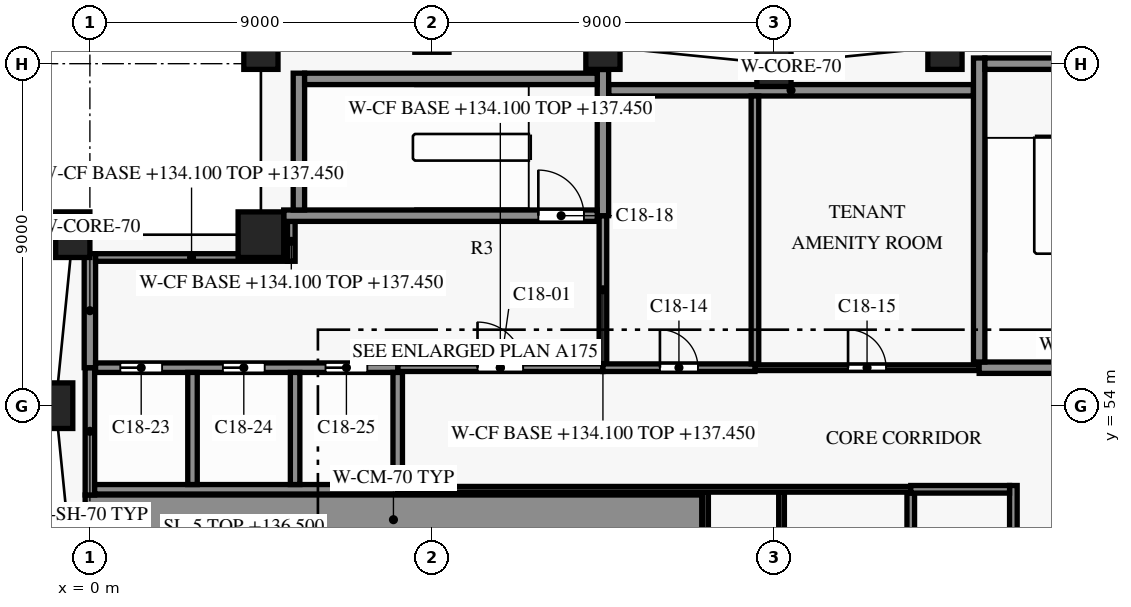
"""IFC4 building model, lengths in metres.
Left out: names, types, materials, properties, quantities, classifications, styles, units other than length and angle.
Written with IfcOpenShell. Run it as: python <this file> out.ifc"""

import sys

from ifc_helpers import new_model, si_unit, direction, frame, frame_2d, origin, origin_2d, place, context, subcontext, project, spatial, rectangle, extrude, element, fill, save


model = new_model("IFC4")
c1 = context("Model", 3, precision=1e-05, world=origin(), true_north=direction((0.0, 1.0)))
c2 = subcontext(c1, "Body", "Model", "MODEL_VIEW")
j1 = project(units=[si_unit("LENGTHUNIT", "METRE"), si_unit("PLANEANGLEUNIT", "RADIAN")], contexts=[c1])
p1 = place(None, origin())
s1 = spatial("IfcSite", under=j1, at=p1, CompositionType="ELEMENT")
p2 = place(p1, origin())
s2 = spatial("IfcBuilding", under=s1, at=p2, CompositionType="ELEMENT")
p3 = place(p2, frame((0.0, 0.0, 134.1)))
s3 = spatial("IfcBuildingStorey", under=s2, at=p3, CompositionType="ELEMENT", Elevation=134.1)
for number, where, z_axis, x_axis in (
    (1, (22.5, 63.45, 0.0), (0.0, 0.0, 1.0), (-0.995, -0.1, 0.0)),
    (2, (18.0, 63.0, 0.0), (0.0, 0.0, 1.0), (-1.0, 0.0, 0.0)),
    (3, (13.5, 63.45, 0.0), (0.0, 0.0, 1.0), (-0.995, 0.1, 0.0)),
    (4, (9.0, 63.9, 0.0), (0.0, 0.0, 1.0), (-1.0, 0.0, 0.0)),
    (5, (4.5, 63.45, 0.0), (0.0, 0.0, 1.0), (-0.995, -0.1, 0.0)),
    (6, (-0.45, 58.5, 0.0), (0.0, 0.0, 1.0), (-0.1, -0.995, 0.0)),
    (7, (-0.9, 54.0, 0.0), (0.0, 0.0, 1.0), (0.0, -1.0, 0.0)),
):
    element("IfcColumn", number, at=place(p3, frame(where, z_axis=z_axis, x_axis=x_axis)), inside=s3, PredefinedType="COLUMN", context=c2, shape_type="SweptSolid", body=[
        extrude(rectangle(XDim=0.9, YDim=1.2, at=origin_2d()), origin(), (0.0, 0.0, 1.0), 3.8),
    ])
p4 = place(p3, frame((4.5, 58.5, 0.0), z_axis=(0.0, 0.0, 1.0), x_axis=(1.0, 0.0, 0.0)))
e8 = element("IfcColumn", 8, at=p4, inside=s3, PredefinedType="COLUMN", context=c2, shape_type="SweptSolid", body=[
    extrude(rectangle(XDim=1.2, YDim=1.2, at=origin_2d()), origin(), (0.0, 0.0, 1.0), 3.8),
])
p5 = place(p3, frame((-0.125, 51.0, 0.0), z_axis=(0.0, 0.0, 1.0), x_axis=(1.0, 0.0, 0.0)))
e9 = element("IfcWall", 9, at=p5, inside=s3, PredefinedType="SHEAR", context=c2, shape_type="SweptSolid", body=[
    extrude(rectangle(XDim=16.225, YDim=1.3, at=frame_2d((8.113, 0.0))), origin(), (0.0, 0.0, 1.0), 3.5),
])
p6 = place(p3, frame((8.1, 51.8, 0.0), z_axis=(0.0, 0.0, 1.0), x_axis=(1.0, 0.0, 0.0)))
e10 = element("IfcWall", 10, at=p6, inside=s3, PredefinedType="PARTITIONING", context=c2, shape_type="SweptSolid", body=[
    extrude(rectangle(XDim=13.5, YDim=0.15, at=frame_2d((6.75, 0.0))), origin(), (0.0, 0.0, 1.0), 3.35),
])
p7 = place(p3, frame((21.6, 51.8, 0.0), z_axis=(0.0, 0.0, 1.0), x_axis=(1.0, 0.0, 0.0)))
e11 = element("IfcWall", 11, at=p7, inside=s3, PredefinedType="PARTITIONING", context=c2, shape_type="SweptSolid", body=[
    extrude(rectangle(XDim=2.6, YDim=0.2, at=frame_2d((1.3, 0.0))), origin(), (0.0, 0.0, 1.0), 3.35),
])
p8 = place(p3, frame((0.125, 51.8, 0.0), z_axis=(0.0, 0.0, 1.0), x_axis=(1.0, 0.0, 0.0)))
e12 = element("IfcWall", 12, at=p8, inside=s3, PredefinedType="SHEAR", context=c2, shape_type="SweptSolid", body=[
    extrude(rectangle(XDim=7.975, YDim=0.25, at=frame_2d((3.988, 0.0))), origin(), (0.0, 0.0, 1.0), 3.5),
])
p9 = place(p3, frame((8.1, 55.0, 0.0), z_axis=(0.0, 0.0, 1.0), x_axis=(1.0, 0.0, 0.0)))
e13 = element("IfcWall", 13, at=p9, inside=s3, PredefinedType="PARTITIONING", context=c2, shape_type="SweptSolid", body=[
    extrude(rectangle(XDim=5.4, YDim=0.2, at=frame_2d((2.7, 0.0))), origin(), (0.0, 0.0, 1.0), 3.35),
])
p10 = place(p9, frame((2.1, 0.0, 0.0)))
e14 = element("IfcOpeningElement", 14, at=p10, cuts=e13, PredefinedType="OPENING", context=c2, shape_type="SweptSolid", body=[
    extrude(rectangle(XDim=1.2, YDim=2.2, at=frame_2d((0.6, 1.1))), frame((0.0, 0.11, 0.0), z_axis=(0.0, -1.0, 0.0), x_axis=(1.0, 0.0, 0.0)), (0.0, 0.0, 1.0), 0.22),
])
p11 = place(p3, frame((17.5, 55.0, 0.0), z_axis=(0.0, 0.0, 1.0), x_axis=(1.0, 0.0, 0.0)))
e15 = element("IfcWall", 15, at=p11, inside=s3, PredefinedType="PARTITIONING", context=c2, shape_type="SweptSolid", body=[
    extrude(rectangle(XDim=5.9, YDim=0.15, at=frame_2d((2.95, 0.0))), origin(), (0.0, 0.0, 1.0), 3.35),
])
p12 = place(p11, frame((2.45, 0.0, 0.0)))
e16 = element("IfcOpeningElement", 16, at=p12, cuts=e15, PredefinedType="OPENING", context=c2, shape_type="SweptSolid", body=[
    extrude(rectangle(XDim=1.0, YDim=2.1, at=frame_2d((0.5, 1.05))), frame((0.0, 0.085, 0.0), z_axis=(0.0, -1.0, 0.0), x_axis=(1.0, 0.0, 0.0)), (0.0, 0.0, 1.0), 0.17),
])
p13 = place(p3, frame((13.5, 55.0, 0.0), z_axis=(0.0, 0.0, 1.0), x_axis=(1.0, 0.0, 0.0)))
e17 = element("IfcWall", 17, at=p13, inside=s3, PredefinedType="PARTITIONING", context=c2, shape_type="SweptSolid", body=[
    extrude(rectangle(XDim=4.0, YDim=0.2, at=frame_2d((2.0, 0.0))), origin(), (0.0, 0.0, 1.0), 3.35),
])
p14 = place(p13, frame((1.5, 0.0, 0.0)))
e18 = element("IfcOpeningElement", 18, at=p14, cuts=e17, PredefinedType="OPENING", context=c2, shape_type="SweptSolid", body=[
    extrude(rectangle(XDim=1.0, YDim=2.1, at=frame_2d((0.5, 1.05))), frame((0.0, 0.11, 0.0), z_axis=(0.0, -1.0, 0.0), x_axis=(1.0, 0.0, 0.0)), (0.0, 0.0, 1.0), 0.22),
])
p15 = place(p3, frame((0.15, 55.0, 0.0), z_axis=(0.0, 0.0, 1.0), x_axis=(1.0, 0.0, 0.0)))
e19 = element("IfcWall", 19, at=p15, inside=s3, PredefinedType="SHEAR", context=c2, shape_type="SweptSolid", body=[
    extrude(rectangle(XDim=7.95, YDim=0.25, at=frame_2d((3.975, 0.0))), origin(), (0.0, 0.0, 1.0), 3.5),
])
p16 = place(p15, frame((0.65, 0.0, 0.0)))
e20 = element("IfcOpeningElement", 20, at=p16, cuts=e19, PredefinedType="OPENING", context=c2, shape_type="SweptSolid", body=[
    extrude(rectangle(XDim=1.1, YDim=2.1, at=frame_2d((0.55, 1.05))), frame((0.0, 0.135, 0.0), z_axis=(0.0, -1.0, 0.0), x_axis=(1.0, 0.0, 0.0)), (0.0, 0.0, 1.0), 0.27),
])
p17 = place(p15, frame((3.35, 0.0, 0.0)))
e21 = element("IfcOpeningElement", 21, at=p17, cuts=e19, PredefinedType="OPENING", context=c2, shape_type="SweptSolid", body=[
    extrude(rectangle(XDim=1.1, YDim=2.1, at=frame_2d((0.55, 1.05))), frame((0.0, 0.135, 0.0), z_axis=(0.0, -1.0, 0.0), x_axis=(1.0, 0.0, 0.0)), (0.0, 0.0, 1.0), 0.27),
])
p18 = place(p15, frame((6.05, 0.0, 0.0)))
e22 = element("IfcOpeningElement", 22, at=p18, cuts=e19, PredefinedType="OPENING", context=c2, shape_type="SweptSolid", body=[
    extrude(rectangle(XDim=1.1, YDim=2.1, at=frame_2d((0.55, 1.05))), frame((0.0, 0.135, 0.0), z_axis=(0.0, -1.0, 0.0), x_axis=(1.0, 0.0, 0.0)), (0.0, 0.0, 1.0), 0.27),
])
p19 = place(p3, frame((23.4, 55.0, 0.0), z_axis=(0.0, 0.0, 1.0), x_axis=(1.0, 0.0, 0.0)))
e23 = element("IfcWall", 23, at=p19, inside=s3, PredefinedType="SHEAR", context=c2, shape_type="SweptSolid", body=[
    extrude(rectangle(XDim=3.45, YDim=0.3, at=frame_2d((1.725, 0.0))), origin(), (0.0, 0.0, 1.0), 3.5),
])
p20 = place(p3, frame((0.15, 57.9, 0.0), z_axis=(0.0, 0.0, 1.0), x_axis=(1.0, 0.0, 0.0)))
e24 = element("IfcWall", 24, at=p20, inside=s3, PredefinedType="PARTITIONING", context=c2, shape_type="SweptSolid", body=[
    extrude(rectangle(XDim=5.05, YDim=0.2, at=frame_2d((2.525, 0.0))), origin(), (0.0, 0.0, 1.0), 3.35),
])
p21 = place(p3, frame((5.1, 59.0, 0.0), z_axis=(0.0, 0.0, 1.0), x_axis=(1.0, 0.0, 0.0)))
e25 = element("IfcWall", 25, at=p21, inside=s3, PredefinedType="SHEAR", context=c2, shape_type="SweptSolid", body=[
    extrude(rectangle(XDim=8.25, YDim=0.3, at=frame_2d((4.125, 0.0))), origin(), (0.0, 0.0, 1.0), 3.5),
])
p22 = place(p21, frame((6.7, 0.0, 0.0)))
e26 = element("IfcOpeningElement", 26, at=p22, cuts=e25, PredefinedType="OPENING", context=c2, shape_type="SweptSolid", body=[
    extrude(rectangle(XDim=1.2, YDim=2.2, at=frame_2d((0.6, 1.1))), frame((0.0, 0.16, 0.0), z_axis=(0.0, -1.0, 0.0), x_axis=(1.0, 0.0, 0.0)), (0.0, 0.0, 1.0), 0.32),
])
p23 = place(p3, frame((13.65, 62.3, 0.0), z_axis=(0.0, 0.0, 1.0), x_axis=(1.0, 0.0, 0.0)))
e27 = element("IfcWall", 27, at=p23, inside=s3, PredefinedType="SHEAR", context=c2, shape_type="SweptSolid", body=[
    extrude(rectangle(XDim=9.6, YDim=0.3, at=frame_2d((4.8, 0.0))), origin(), (0.0, 0.0, 1.0), 3.5),
])
p24 = place(p3, frame((5.65, 62.6, 0.0), z_axis=(0.0, 0.0, 1.0), x_axis=(1.0, 0.0, 0.0)))
e28 = element("IfcWall", 28, at=p24, inside=s3, PredefinedType="SHEAR", context=c2, shape_type="SweptSolid", body=[
    extrude(rectangle(XDim=7.7, YDim=0.3, at=frame_2d((3.85, 0.0))), origin(), (0.0, 0.0, 1.0), 3.5),
])
p25 = place(p3, frame((23.55, 63.0, 0.0), z_axis=(0.0, 0.0, 1.0), x_axis=(1.0, 0.0, 0.0)))
e29 = element("IfcWall", 29, at=p25, inside=s3, PredefinedType="SHEAR", context=c2, shape_type="SweptSolid", body=[
    extrude(rectangle(XDim=3.3, YDim=0.3, at=frame_2d((1.65, 0.0))), origin(), (0.0, 0.0, 1.0), 3.5),
])
p26 = place(p3, frame((0.0, 55.0, 0.0), z_axis=(0.0, 0.0, 1.0), x_axis=(0.0, 1.0, 0.0)))
e30 = element("IfcWall", 30, at=p26, inside=s3, PredefinedType="SHEAR", context=c2, shape_type="SweptSolid", body=[
    extrude(rectangle(XDim=3.0, YDim=0.3, at=frame_2d((1.5, 0.0))), origin(), (0.0, 0.0, 1.0), 3.5),
])
p27 = place(p3, frame((0.0, 51.65, 0.0), z_axis=(0.0, 0.0, 1.0), x_axis=(0.0, 1.0, 0.0)))
e31 = element("IfcWall", 31, at=p27, inside=s3, PredefinedType="SHEAR", context=c2, shape_type="SweptSolid", body=[
    extrude(rectangle(XDim=3.35, YDim=0.25, at=frame_2d((1.675, 0.0))), origin(), (0.0, 0.0, 1.0), 3.5),
])
p28 = place(p3, frame((2.7, 51.925, 0.0), z_axis=(0.0, 0.0, 1.0), x_axis=(0.0, 1.0, 0.0)))
e32 = element("IfcWall", 32, at=p28, inside=s3, PredefinedType="SHEAR", context=c2, shape_type="SweptSolid", body=[
    extrude(rectangle(XDim=2.95, YDim=0.25, at=frame_2d((1.475, 0.0))), origin(), (0.0, 0.0, 1.0), 3.5),
])
p29 = place(p3, frame((5.3, 57.8, 0.0), z_axis=(0.0, 0.0, 1.0), x_axis=(0.0, 1.0, 0.0)))
e33 = element("IfcWall", 33, at=p29, inside=s3, PredefinedType="PARTITIONING", context=c2, shape_type="SweptSolid", body=[
    extrude(rectangle(XDim=1.05, YDim=0.2, at=frame_2d((0.525, 0.0))), origin(), (0.0, 0.0, 1.0), 3.35),
])
p30 = place(p3, frame((5.4, 51.925, 0.0), z_axis=(0.0, 0.0, 1.0), x_axis=(0.0, 1.0, 0.0)))
e34 = element("IfcWall", 34, at=p30, inside=s3, PredefinedType="SHEAR", context=c2, shape_type="SweptSolid", body=[
    extrude(rectangle(XDim=2.95, YDim=0.25, at=frame_2d((1.475, 0.0))), origin(), (0.0, 0.0, 1.0), 3.5),
])
p31 = place(p3, frame((5.5, 59.15, 0.0), z_axis=(0.0, 0.0, 1.0), x_axis=(0.0, 1.0, 0.0)))
e35 = element("IfcWall", 35, at=p31, inside=s3, PredefinedType="SHEAR", context=c2, shape_type="SweptSolid", body=[
    extrude(rectangle(XDim=3.6, YDim=0.3, at=frame_2d((1.8, 0.0))), origin(), (0.0, 0.0, 1.0), 3.5),
])
p32 = place(p3, frame((8.1, 51.925, 0.0), z_axis=(0.0, 0.0, 1.0), x_axis=(0.0, 1.0, 0.0)))
e36 = element("IfcWall", 36, at=p32, inside=s3, PredefinedType="SHEAR", context=c2, shape_type="SweptSolid", body=[
    extrude(rectangle(XDim=2.95, YDim=0.25, at=frame_2d((1.475, 0.0))), origin(), (0.0, 0.0, 1.0), 3.5),
])
p33 = place(p3, frame((13.5, 55.1, 0.0), z_axis=(0.0, 0.0, 1.0), x_axis=(0.0, 1.0, 0.0)))
e37 = element("IfcWall", 37, at=p33, inside=s3, PredefinedType="PARTITIONING", context=c2, shape_type="SweptSolid", body=[
    extrude(rectangle(XDim=3.9, YDim=0.2, at=frame_2d((1.95, 0.0))), origin(), (0.0, 0.0, 1.0), 3.35),
])
p34 = place(p3, frame((13.5, 59.0, 0.0), z_axis=(0.0, 0.0, 1.0), x_axis=(0.0, 1.0, 0.0)))
e38 = element("IfcWall", 38, at=p34, inside=s3, PredefinedType="SHEAR", context=c2, shape_type="SweptSolid", body=[
    extrude(rectangle(XDim=3.847, YDim=0.3, at=frame_2d((1.923, 0.0))), origin(), (0.0, 0.0, 1.0), 3.5),
])
p35 = place(p3, frame((16.2, 50.2, 0.0), z_axis=(0.0, 0.0, 1.0), x_axis=(0.0, 1.0, 0.0)))
e39 = element("IfcWall", 39, at=p35, inside=s3, PredefinedType="PARTITIONING", context=c2, shape_type="SweptSolid", body=[
    extrude(rectangle(XDim=1.525, YDim=0.15, at=frame_2d((0.763, 0.0))), origin(), (0.0, 0.0, 1.0), 3.35),
])
p36 = place(p3, frame((17.5, 55.1, 0.0), z_axis=(0.0, 0.0, 1.0), x_axis=(0.0, 1.0, 0.0)))
e40 = element("IfcWall", 40, at=p36, inside=s3, PredefinedType="PARTITIONING", context=c2, shape_type="SweptSolid", body=[
    extrude(rectangle(XDim=7.05, YDim=0.2, at=frame_2d((3.525, 0.0))), origin(), (0.0, 0.0, 1.0), 3.35),
])
p37 = place(p3, frame((18.2, 47.1, 0.0), z_axis=(0.0, 0.0, 1.0), x_axis=(0.0, 1.0, 0.0)))
e41 = element("IfcWall", 41, at=p37, inside=s3, PredefinedType="PARTITIONING", context=c2, shape_type="SweptSolid", body=[
    extrude(rectangle(XDim=4.625, YDim=0.15, at=frame_2d((2.312, 0.0))), origin(), (0.0, 0.0, 1.0), 3.35),
])
p38 = place(p3, frame((21.6, 47.1, 0.0), z_axis=(0.0, 0.0, 1.0), x_axis=(0.0, 1.0, 0.0)))
e42 = element("IfcWall", 42, at=p38, inside=s3, PredefinedType="PARTITIONING", context=c2, shape_type="SweptSolid", body=[
    extrude(rectangle(XDim=4.6, YDim=0.2, at=frame_2d((2.3, 0.0))), origin(), (0.0, 0.0, 1.0), 3.35),
])
p39 = place(p3, frame((23.4, 55.15, 0.0), z_axis=(0.0, 0.0, 1.0), x_axis=(0.0, 1.0, 0.0)))
e43 = element("IfcWall", 43, at=p39, inside=s3, PredefinedType="SHEAR", context=c2, shape_type="SweptSolid", body=[
    extrude(rectangle(XDim=8.0, YDim=0.3, at=frame_2d((4.0, 0.0))), origin(), (0.0, 0.0, 1.0), 3.5),
])
p40 = place(p3, frame((24.3, 46.9, 0.0), z_axis=(0.0, 0.0, 1.0), x_axis=(0.0, 1.0, 0.0)))
e44 = element("IfcWall", 44, at=p40, inside=s3, PredefinedType="SHEAR", context=c2, shape_type="SweptSolid", body=[
    extrude(rectangle(XDim=5.0, YDim=0.2, at=frame_2d((2.5, 0.0))), origin(), (0.0, 0.0, 1.0), 3.5),
])
p41 = place(p10, origin())
e45 = element("IfcDoor", 45, at=p41, inside=s3, OperationType="SINGLE_SWING_RIGHT", PredefinedType="DOOR", context=c2, shape_type="SweptSolid", body=[
    extrude(rectangle(XDim=1.2, YDim=2.2, at=frame_2d((0.6, 1.1))), frame((0.0, 0.025, 0.0), z_axis=(0.0, -1.0, 0.0), x_axis=(1.0, 0.0, 0.0)), (0.0, 0.0, 1.0), 0.05),
])
fill(e14, e45)
p42 = place(p14, origin())
e46 = element("IfcDoor", 46, at=p42, inside=s3, OperationType="SINGLE_SWING_LEFT", PredefinedType="DOOR", context=c2, shape_type="SweptSolid", body=[
    extrude(rectangle(XDim=1.0, YDim=2.1, at=frame_2d((0.5, 1.05))), frame((0.0, 0.025, 0.0), z_axis=(0.0, -1.0, 0.0), x_axis=(1.0, 0.0, 0.0)), (0.0, 0.0, 1.0), 0.05),
])
fill(e18, e46)
p43 = place(p12, origin())
e47 = element("IfcDoor", 47, at=p43, inside=s3, OperationType="SINGLE_SWING_RIGHT", PredefinedType="DOOR", context=c2, shape_type="SweptSolid", body=[
    extrude(rectangle(XDim=1.0, YDim=2.1, at=frame_2d((0.5, 1.05))), frame((0.0, 0.025, 0.0), z_axis=(0.0, -1.0, 0.0), x_axis=(1.0, 0.0, 0.0)), (0.0, 0.0, 1.0), 0.05),
])
fill(e16, e47)
p44 = place(p22, origin())
e48 = element("IfcDoor", 48, at=p44, inside=s3, OperationType="SINGLE_SWING_RIGHT", PredefinedType="DOOR", context=c2, shape_type="SweptSolid", body=[
    extrude(rectangle(XDim=1.2, YDim=2.2, at=frame_2d((0.6, 1.1))), frame((0.0, 0.025, 0.0), z_axis=(0.0, -1.0, 0.0), x_axis=(1.0, 0.0, 0.0)), (0.0, 0.0, 1.0), 0.05),
])
fill(e26, e48)
p45 = place(p16, origin())
e49 = element("IfcDoor", 49, at=p45, inside=s3, OperationType="DOUBLE_DOOR_SLIDING", PredefinedType="DOOR", context=c2, shape_type="SweptSolid", body=[
    extrude(rectangle(XDim=1.1, YDim=2.1, at=frame_2d((0.55, 1.05))), frame((0.0, 0.025, 0.0), z_axis=(0.0, -1.0, 0.0), x_axis=(1.0, 0.0, 0.0)), (0.0, 0.0, 1.0), 0.05),
])
fill(e20, e49)
p46 = place(p17, origin())
e50 = element("IfcDoor", 50, at=p46, inside=s3, OperationType="DOUBLE_DOOR_SLIDING", PredefinedType="DOOR", context=c2, shape_type="SweptSolid", body=[
    extrude(rectangle(XDim=1.1, YDim=2.1, at=frame_2d((0.55, 1.05))), frame((0.0, 0.025, 0.0), z_axis=(0.0, -1.0, 0.0), x_axis=(1.0, 0.0, 0.0)), (0.0, 0.0, 1.0), 0.05),
])
fill(e21, e50)
p47 = place(p18, origin())
e51 = element("IfcDoor", 51, at=p47, inside=s3, OperationType="DOUBLE_DOOR_SLIDING", PredefinedType="DOOR", context=c2, shape_type="SweptSolid", body=[
    extrude(rectangle(XDim=1.1, YDim=2.1, at=frame_2d((0.55, 1.05))), frame((0.0, 0.025, 0.0), z_axis=(0.0, -1.0, 0.0), x_axis=(1.0, 0.0, 0.0)), (0.0, 0.0, 1.0), 0.05),
])
fill(e22, e51)
save(model, sys.argv[1])
